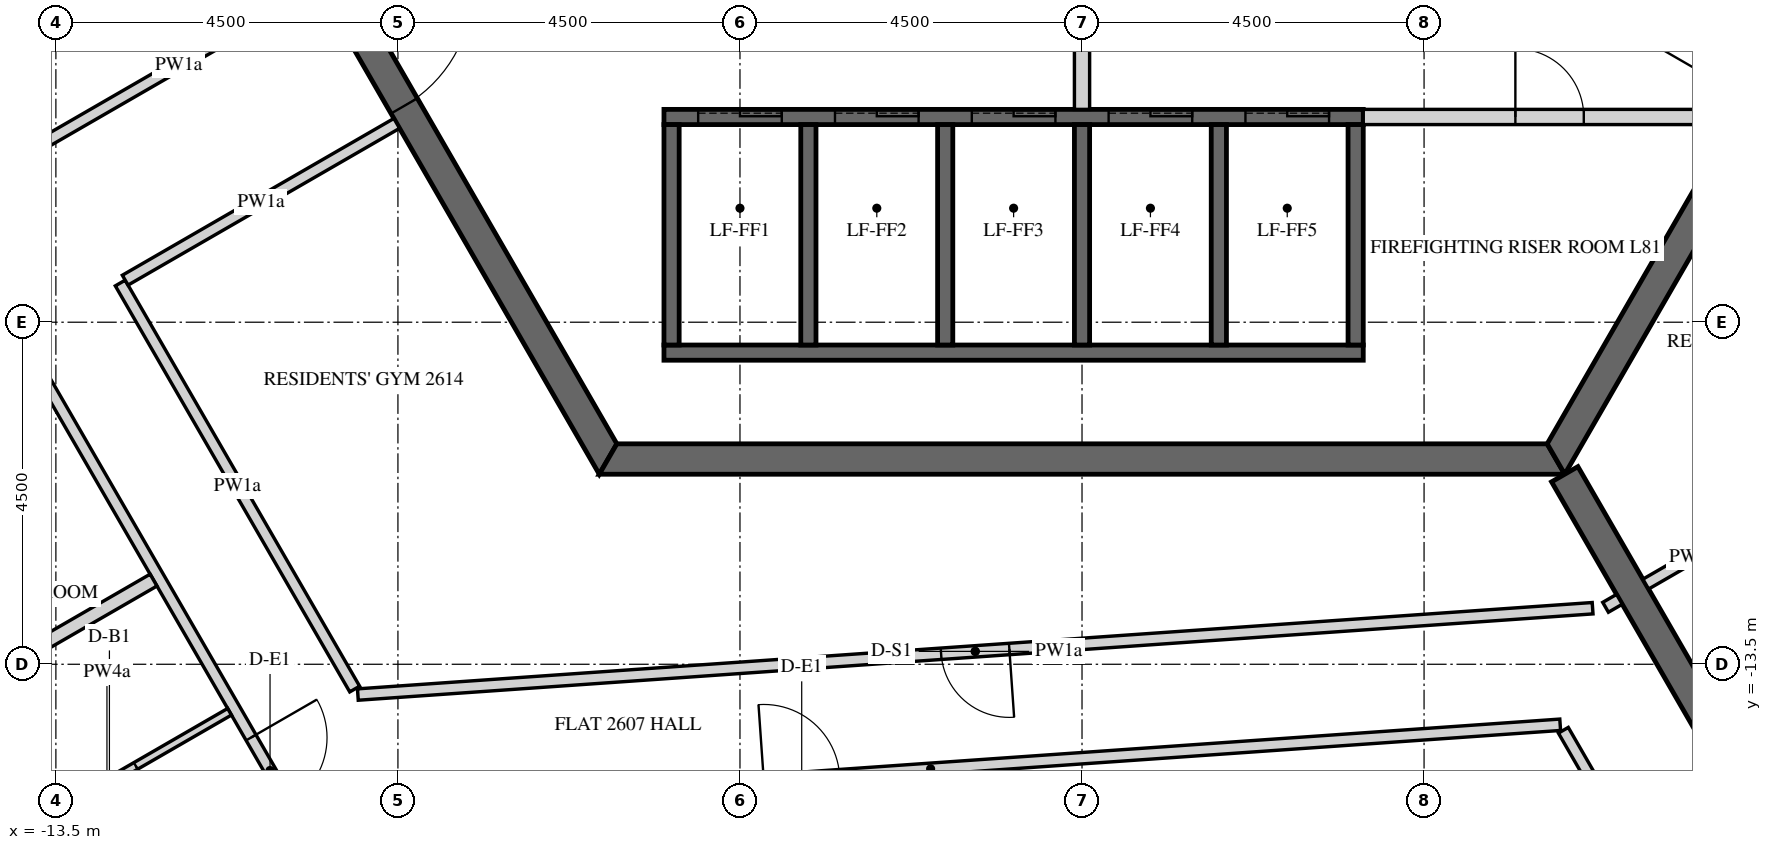
"""IFC4 building model, lengths in metres.
Left out: names, types, materials, properties, quantities, classifications, styles, units other than length and angle.
Written with IfcOpenShell. Run it as: python <this file> out.ifc"""

import sys

from ifc_helpers import new_model, si_unit, direction, frame, frame_2d, origin, place, context, subcontext, project, spatial, polyline, rectangle, outline, extrude, element, fill, save


model = new_model("IFC4")
c1 = context("Model", 3, precision=1e-05, world=origin(), true_north=direction((0.0, 1.0)))
c2 = subcontext(c1, "Body", "Model", "MODEL_VIEW")
j1 = project(units=[si_unit("LENGTHUNIT", "METRE"), si_unit("PLANEANGLEUNIT", "RADIAN")], contexts=[c1])
p1 = place(None, origin())
s1 = spatial("IfcSite", under=j1, at=p1, CompositionType="ELEMENT")
p2 = place(p1, origin())
s2 = spatial("IfcBuilding", under=s1, at=p2, CompositionType="ELEMENT")
p3 = place(p2, frame((0.0, 0.0, 334.2)))
s3 = spatial("IfcBuildingStorey", under=s2, at=p3, CompositionType="ELEMENT", Elevation=334.2)
p4 = place(p3, frame((-12.471, 0.0, -0.15), z_axis=(0.0, 0.0, 1.0), x_axis=(0.499996419489, -0.866027470984, 0.0)))
e1 = element("IfcWall", 1, at=p4, inside=s3, PredefinedType="SHEAR", context=c2, shape_type="SweptSolid", body=[
    extrude(outline(polyline([(-0.115, -0.2), (12.586, -0.2), (12.355, 0.2), (0.115, 0.2), (-0.115, -0.2)])), origin(), (0.0, 0.0, 1.0), 3.75),
])
p5 = place(p4, frame((5.306, 0.0, 0.15)))
e2 = element("IfcOpeningElement", 2, at=p5, cuts=e1, PredefinedType="OPENING", context=c2, shape_type="SweptSolid", body=[
    extrude(rectangle(XDim=1.8, YDim=2.4, at=frame_2d((0.9, 1.2))), frame((0.0, 0.21, 0.0), z_axis=(0.0, -1.0, 0.0), x_axis=(1.0, 0.0, 0.0)), (0.0, 0.0, 1.0), 0.42),
])
p6 = place(p3, frame((-6.235, -10.8, -0.15), z_axis=(0.0, 0.0, 1.0), x_axis=(1.0, 0.0, 0.0)))
e3 = element("IfcWall", 3, at=p6, inside=s3, PredefinedType="SHEAR", context=c2, shape_type="SweptSolid", body=[
    extrude(outline(polyline([(-0.115, -0.2), (12.586, -0.2), (12.355, 0.2), (0.115, 0.2), (-0.115, -0.2)])), origin(), (0.0, 0.0, 1.0), 3.75),
])
p7 = place(p3, frame((6.235, -10.8, -0.15), z_axis=(0.0, 0.0, 1.0), x_axis=(0.499996419489, 0.866027470984, 0.0)))
e4 = element("IfcWall", 4, at=p7, inside=s3, PredefinedType="SHEAR", context=c2, shape_type="SweptSolid", body=[
    extrude(outline(polyline([(-0.115, -0.2), (12.586, -0.2), (12.355, 0.2), (0.115, 0.2), (-0.115, -0.2)])), origin(), (0.0, 0.0, 1.0), 3.75),
])
p8 = place(p7, frame((5.364, 0.0, 0.15)))
e5 = element("IfcOpeningElement", 5, at=p8, cuts=e4, PredefinedType="OPENING", context=c2, shape_type="SweptSolid", body=[
    extrude(rectangle(XDim=1.8, YDim=2.4, at=frame_2d((0.9, 1.2))), frame((0.0, 0.21, 0.0), z_axis=(0.0, -1.0, 0.0), x_axis=(1.0, 0.0, 0.0)), (0.0, 0.0, 1.0), 0.42),
])
p9 = place(p3, frame((6.351, -11.0, -0.15), z_axis=(0.0, 0.0, 1.0), x_axis=(0.499998894578, -0.866026041999, 0.0)))
e6 = element("IfcWall", 6, at=p9, inside=s3, PredefinedType="SHEAR", context=c2, shape_type="SweptSolid", body=[
    extrude(rectangle(XDim=15.544, YDim=0.4, at=frame_2d((7.772, 0.0))), origin(), (0.0, 0.0, 1.0), 3.75),
])
p10 = place(p9, frame((6.872, 0.0, 0.15)))
e7 = element("IfcOpeningElement", 7, at=p10, cuts=e6, PredefinedType="OPENING", context=c2, shape_type="SweptSolid", body=[
    extrude(rectangle(XDim=1.8, YDim=2.4, at=frame_2d((0.9, 1.2))), frame((0.0, 0.21, 0.0), z_axis=(0.0, -1.0, 0.0), x_axis=(1.0, 0.0, 0.0)), (0.0, 0.0, 1.0), 0.42),
])
p11 = place(p3, frame((-5.5, -6.3, -0.25), z_axis=(0.0, 0.0, 1.0), x_axis=(1.0, 0.0, 0.0)))
e8 = element("IfcWall", 8, at=p11, inside=s3, PredefinedType="SHEAR", context=c2, shape_type="SweptSolid", body=[
    extrude(rectangle(XDim=9.2, YDim=0.2, at=frame_2d((4.6, 0.0))), origin(), (0.0, 0.0, 1.0), 3.9),
])
p12 = place(p11, frame((0.45, 0.0, 0.25)))
e9 = element("IfcOpeningElement", 9, at=p12, cuts=e8, PredefinedType="OPENING", context=c2, shape_type="SweptSolid", body=[
    extrude(rectangle(XDim=1.1, YDim=2.1, at=frame_2d((0.55, 1.05))), frame((0.0, 0.11, 0.0), z_axis=(0.0, -1.0, 0.0), x_axis=(1.0, 0.0, 0.0)), (0.0, 0.0, 1.0), 0.22),
])
p13 = place(p11, frame((2.25, 0.0, 0.25)))
e10 = element("IfcOpeningElement", 10, at=p13, cuts=e8, PredefinedType="OPENING", context=c2, shape_type="SweptSolid", body=[
    extrude(rectangle(XDim=1.1, YDim=2.1, at=frame_2d((0.55, 1.05))), frame((0.0, 0.11, 0.0), z_axis=(0.0, -1.0, 0.0), x_axis=(1.0, 0.0, 0.0)), (0.0, 0.0, 1.0), 0.22),
])
p14 = place(p11, frame((4.05, 0.0, 0.25)))
e11 = element("IfcOpeningElement", 11, at=p14, cuts=e8, PredefinedType="OPENING", context=c2, shape_type="SweptSolid", body=[
    extrude(rectangle(XDim=1.1, YDim=2.1, at=frame_2d((0.55, 1.05))), frame((0.0, 0.11, 0.0), z_axis=(0.0, -1.0, 0.0), x_axis=(1.0, 0.0, 0.0)), (0.0, 0.0, 1.0), 0.22),
])
p15 = place(p11, frame((5.85, 0.0, 0.25)))
e12 = element("IfcOpeningElement", 12, at=p15, cuts=e8, PredefinedType="OPENING", context=c2, shape_type="SweptSolid", body=[
    extrude(rectangle(XDim=1.1, YDim=2.1, at=frame_2d((0.55, 1.05))), frame((0.0, 0.11, 0.0), z_axis=(0.0, -1.0, 0.0), x_axis=(1.0, 0.0, 0.0)), (0.0, 0.0, 1.0), 0.22),
])
p16 = place(p11, frame((7.65, 0.0, 0.25)))
e13 = element("IfcOpeningElement", 13, at=p16, cuts=e8, PredefinedType="OPENING", context=c2, shape_type="SweptSolid", body=[
    extrude(rectangle(XDim=1.1, YDim=2.1, at=frame_2d((0.55, 1.05))), frame((0.0, 0.11, 0.0), z_axis=(0.0, -1.0, 0.0), x_axis=(1.0, 0.0, 0.0)), (0.0, 0.0, 1.0), 0.22),
])
p17 = place(p3, frame((-5.5, -9.4, -0.25), z_axis=(0.0, 0.0, 1.0), x_axis=(1.0, 0.0, 0.0)))
e14 = element("IfcWall", 14, at=p17, inside=s3, PredefinedType="SHEAR", context=c2, shape_type="SweptSolid", body=[
    extrude(rectangle(XDim=9.2, YDim=0.2, at=frame_2d((4.6, 0.0))), origin(), (0.0, 0.0, 1.0), 3.9),
])
for number, where, z_axis, x_axis in (
    (15, (-5.4, -9.3, -0.25), (0.0, 0.0, 1.0), (0.0, 1.0, 0.0)),
    (16, (-3.6, -9.3, -0.25), (0.0, 0.0, 1.0), (0.0, 1.0, 0.0)),
    (17, (-1.8, -9.3, -0.25), (0.0, 0.0, 1.0), (0.0, 1.0, 0.0)),
    (18, (0.0, -9.3, -0.25), (0.0, 0.0, 1.0), (0.0, 1.0, 0.0)),
    (19, (1.8, -9.3, -0.25), (0.0, 0.0, 1.0), (0.0, 1.0, 0.0)),
    (20, (3.6, -9.3, -0.25), (0.0, 0.0, 1.0), (0.0, 1.0, 0.0)),
):
    element("IfcWall", number, at=place(p3, frame(where, z_axis=z_axis, x_axis=x_axis)), inside=s3, PredefinedType="SHEAR", context=c2, shape_type="SweptSolid", body=[
        extrude(rectangle(XDim=2.9, YDim=0.2, at=frame_2d((1.45, 0.0))), origin(), (0.0, 0.0, 1.0), 3.9),
    ])
p18 = place(p3, frame((0.0, -6.2, 0.0), z_axis=(0.0, 0.0, 1.0), x_axis=(0.0, 1.0, 0.0)))
e21 = element("IfcWall", 21, at=p18, inside=s3, PredefinedType="PARTITIONING", context=c2, shape_type="SweptSolid", body=[
    extrude(rectangle(XDim=6.1, YDim=0.2, at=frame_2d((3.05, 0.0))), origin(), (0.0, 0.0, 1.0), 3.65),
])
p19 = place(p3, frame((3.7, -6.3, 0.0), z_axis=(0.0, 0.0, 1.0), x_axis=(1.0, 0.0, 0.0)))
e22 = element("IfcWall", 22, at=p19, inside=s3, PredefinedType="PARTITIONING", context=c2, shape_type="SweptSolid", body=[
    extrude(rectangle(XDim=4.903, YDim=0.2, at=frame_2d((2.451, 0.0))), origin(), (0.0, 0.0, 1.0), 3.65),
])
p20 = place(p19, frame((2.001, 0.0, 0.0)))
e23 = element("IfcOpeningElement", 23, at=p20, cuts=e22, PredefinedType="OPENING", context=c2, shape_type="SweptSolid", body=[
    extrude(rectangle(XDim=0.9, YDim=2.1, at=frame_2d((0.45, 1.05))), frame((0.0, 0.11, 0.0), z_axis=(0.0, -1.0, 0.0), x_axis=(1.0, 0.0, 0.0)), (0.0, 0.0, 1.0), 0.22),
])
p21 = place(p3, frame((-17.696, -2.749, 0.0), z_axis=(0.0, 0.0, 1.0), x_axis=(0.499997948852, -0.866026588012, 0.0)))
e24 = element("IfcWall", 24, at=p21, inside=s3, PredefinedType="PARTITIONING", context=c2, shape_type="SweptSolid", body=[
    extrude(rectangle(XDim=14.677, YDim=0.15, at=frame_2d((7.339, 0.0))), origin(), (0.0, 0.0, 1.0), 2.838),
])
p22 = place(p21, frame((0.4, 0.0, 0.0)))
e25 = element("IfcOpeningElement", 25, at=p22, cuts=e24, PredefinedType="OPENING", context=c2, shape_type="SweptSolid", body=[
    extrude(rectangle(XDim=1.0, YDim=2.1, at=frame_2d((0.5, 1.05))), frame((0.0, 0.085, 0.0), z_axis=(0.0, -1.0, 0.0), x_axis=(1.0, 0.0, 0.0)), (0.0, 0.0, 1.0), 0.17),
])
p23 = place(p21, frame((13.527, 0.0, 0.0)))
e26 = element("IfcOpeningElement", 26, at=p23, cuts=e24, PredefinedType="OPENING", context=c2, shape_type="SweptSolid", body=[
    extrude(rectangle(XDim=1.0, YDim=2.1, at=frame_2d((0.5, 1.05))), frame((0.0, 0.085, 0.0), z_axis=(0.0, -1.0, 0.0), x_axis=(1.0, 0.0, 0.0)), (0.0, 0.0, 1.0), 0.17),
])
p24 = place(p3, frame((-10.274, -15.454, 0.0), z_axis=(0.0, 0.0, 1.0), x_axis=(0.997563645223, 0.069762265797, 0.0)))
e27 = element("IfcWall", 27, at=p24, inside=s3, PredefinedType="PARTITIONING", context=c2, shape_type="SweptSolid", body=[
    extrude(rectangle(XDim=16.606, YDim=0.15, at=frame_2d((8.303, 0.0))), origin(), (0.0, 0.0, 1.0), 2.838),
])
p25 = place(p24, frame((6.103, 0.0, 0.0)))
e28 = element("IfcOpeningElement", 28, at=p25, cuts=e27, PredefinedType="OPENING", context=c2, shape_type="SweptSolid", body=[
    extrude(rectangle(XDim=1.0, YDim=2.1, at=frame_2d((0.5, 1.05))), frame((0.0, 0.085, 0.0), z_axis=(0.0, -1.0, 0.0), x_axis=(1.0, 0.0, 0.0)), (0.0, 0.0, 1.0), 0.17),
])
p26 = place(p3, frame((6.333, -14.368, 0.0), z_axis=(0.0, 0.0, 1.0), x_axis=(0.499977396983, -0.866038453249, 0.0)))
e29 = element("IfcWall", 29, at=p26, inside=s3, PredefinedType="PARTITIONING", context=c2, shape_type="SweptSolid", body=[
    extrude(rectangle(XDim=7.764, YDim=0.15, at=frame_2d((3.882, 0.0))), origin(), (0.0, 0.0, 1.0), 2.838),
])
p27 = place(p26, frame((4.364, 0.0, 0.0)))
e30 = element("IfcOpeningElement", 30, at=p27, cuts=e29, PredefinedType="OPENING", context=c2, shape_type="SweptSolid", body=[
    extrude(rectangle(XDim=1.0, YDim=2.1, at=frame_2d((0.5, 1.05))), frame((0.0, 0.085, 0.0), z_axis=(0.0, -1.0, 0.0), x_axis=(1.0, 0.0, 0.0)), (0.0, 0.0, 1.0), 0.17),
])
p28 = place(p3, frame((-10.066, -4.566, 0.0), z_axis=(0.0, 0.0, 1.0), x_axis=(-0.866023935413, -0.500002543286, 0.0)))
e31 = element("IfcWall", 31, at=p28, inside=s3, PredefinedType="PARTITIONING", context=c2, shape_type="SweptSolid", body=[
    extrude(rectangle(XDim=4.2, YDim=0.15, at=frame_2d((2.1, 0.0))), origin(), (0.0, 0.0, 1.0), 2.838),
])
p29 = place(p3, frame((7.07, -12.646, 0.0), z_axis=(0.0, 0.0, 1.0), x_axis=(-0.866378867349, -0.499387282788, 0.0)))
e32 = element("IfcWall", 32, at=p29, inside=s3, PredefinedType="PARTITIONING", context=c2, shape_type="SweptSolid", body=[
    extrude(rectangle(XDim=0.21, YDim=0.15, at=frame_2d((0.105, 0.0))), origin(), (0.0, 0.0, 1.0), 2.838),
])
p30 = place(p3, frame((6.717, -12.762, 0.0), z_axis=(0.0, 0.0, 1.0), x_axis=(-0.99756375843, -0.069760646978, 0.0)))
e33 = element("IfcWall", 33, at=p30, inside=s3, PredefinedType="PARTITIONING", context=c2, shape_type="SweptSolid", body=[
    extrude(rectangle(XDim=16.284, YDim=0.15, at=frame_2d((8.142, 0.0))), origin(), (0.0, 0.0, 1.0), 2.838),
])
p31 = place(p30, frame((7.692, 0.0, 0.0)))
e34 = element("IfcOpeningElement", 34, at=p31, cuts=e33, PredefinedType="OPENING", context=c2, shape_type="SweptSolid", body=[
    extrude(rectangle(XDim=0.9, YDim=2.1, at=frame_2d((0.45, 1.05))), frame((0.0, 0.085, 0.0), z_axis=(0.0, -1.0, 0.0), x_axis=(1.0, 0.0, 0.0)), (0.0, 0.0, 1.0), 0.17),
])
p32 = place(p3, frame((-9.569, -13.826, 0.0), z_axis=(0.0, 0.0, 1.0), x_axis=(-0.500017101833, 0.866015529811, 0.0)))
e35 = element("IfcWall", 35, at=p32, inside=s3, PredefinedType="PARTITIONING", context=c2, shape_type="SweptSolid", body=[
    extrude(rectangle(XDim=6.168, YDim=0.15, at=frame_2d((3.084, 0.0))), origin(), (0.0, 0.0, 1.0), 2.838),
])
p33 = place(p3, frame((-12.588, -8.447, 0.0), z_axis=(0.0, 0.0, 1.0), x_axis=(0.866034795751, 0.499983732284, 0.0)))
e36 = element("IfcWall", 36, at=p33, inside=s3, PredefinedType="PARTITIONING", context=c2, shape_type="SweptSolid", body=[
    extrude(rectangle(XDim=4.125, YDim=0.15, at=frame_2d((2.062, 0.0))), origin(), (0.0, 0.0, 1.0), 2.838),
])
p34 = place(p3, frame((8.65, -11.733, 0.0), z_axis=(0.0, 0.0, 1.0), x_axis=(-0.866062911188, -0.499935029643, 0.0)))
e37 = element("IfcWall", 37, at=p34, inside=s3, PredefinedType="PARTITIONING", context=c2, shape_type="SweptSolid", body=[
    extrude(rectangle(XDim=1.425, YDim=0.15, at=frame_2d((0.712, 0.0))), origin(), (0.0, 0.0, 1.0), 2.838),
])
p35 = place(p3, frame((-19.771, -16.755, 0.0), z_axis=(0.0, 0.0, 1.0), x_axis=(0.866025292695, 0.500000192413, 0.0)))
e38 = element("IfcWall", 38, at=p35, inside=s3, PredefinedType="PARTITIONING", context=c2, shape_type="SweptSolid", body=[
    extrude(rectangle(XDim=8.725, YDim=0.18, at=frame_2d((4.363, 0.0))), origin(), (0.0, 0.0, 1.0), 2.838),
])
p36 = place(p3, frame((-11.215, -14.125, 0.0), z_axis=(0.0, 0.0, 1.0), x_axis=(-0.866028424924, -0.499994767197, 0.0)))
e39 = element("IfcWall", 39, at=p36, inside=s3, PredefinedType="PARTITIONING", context=c2, shape_type="SweptSolid", body=[
    extrude(rectangle(XDim=3.725, YDim=0.1, at=frame_2d((1.863, 0.0))), origin(), (0.0, 0.0, 1.0), 2.838),
])
p37 = place(p36, frame((1.425, 0.0, 0.0)))
e40 = element("IfcOpeningElement", 40, at=p37, cuts=e39, PredefinedType="OPENING", context=c2, shape_type="SweptSolid", body=[
    extrude(rectangle(XDim=0.8, YDim=2.1, at=frame_2d((0.4, 1.05))), frame((0.0, 0.06, 0.0), z_axis=(0.0, -1.0, 0.0), x_axis=(1.0, 0.0, 0.0)), (0.0, 0.0, 1.0), 0.12),
])
p38 = place(p5, origin())
e41 = element("IfcDoor", 41, at=p38, inside=s3, OperationType="DOUBLE_DOOR_SINGLE_SWING", PredefinedType="DOOR", context=c2, shape_type="SweptSolid", body=[
    extrude(rectangle(XDim=1.8, YDim=2.4, at=frame_2d((0.9, 1.2))), frame((0.0, 0.025, 0.0), z_axis=(0.0, -1.0, 0.0), x_axis=(1.0, 0.0, 0.0)), (0.0, 0.0, 1.0), 0.05),
])
fill(e2, e41)
p39 = place(p20, origin())
e42 = element("IfcDoor", 42, at=p39, inside=s3, OperationType="SINGLE_SWING_LEFT", PredefinedType="DOOR", context=c2, shape_type="SweptSolid", body=[
    extrude(rectangle(XDim=0.9, YDim=2.1, at=frame_2d((0.45, 1.05))), frame((0.0, 0.025, 0.0), z_axis=(0.0, -1.0, 0.0), x_axis=(1.0, 0.0, 0.0)), (0.0, 0.0, 1.0), 0.05),
])
fill(e23, e42)
p40 = place(p12, origin())
e43 = element("IfcDoor", 43, at=p40, inside=s3, OperationType="SLIDING_TO_LEFT", PredefinedType="DOOR", context=c2, shape_type="SweptSolid", body=[
    extrude(rectangle(XDim=1.1, YDim=2.1, at=frame_2d((0.55, 1.05))), frame((0.0, 0.025, 0.0), z_axis=(0.0, -1.0, 0.0), x_axis=(1.0, 0.0, 0.0)), (0.0, 0.0, 1.0), 0.05),
])
fill(e9, e43)
p41 = place(p13, origin())
e44 = element("IfcDoor", 44, at=p41, inside=s3, OperationType="SLIDING_TO_LEFT", PredefinedType="DOOR", context=c2, shape_type="SweptSolid", body=[
    extrude(rectangle(XDim=1.1, YDim=2.1, at=frame_2d((0.55, 1.05))), frame((0.0, 0.025, 0.0), z_axis=(0.0, -1.0, 0.0), x_axis=(1.0, 0.0, 0.0)), (0.0, 0.0, 1.0), 0.05),
])
fill(e10, e44)
p42 = place(p14, origin())
e45 = element("IfcDoor", 45, at=p42, inside=s3, OperationType="SLIDING_TO_LEFT", PredefinedType="DOOR", context=c2, shape_type="SweptSolid", body=[
    extrude(rectangle(XDim=1.1, YDim=2.1, at=frame_2d((0.55, 1.05))), frame((0.0, 0.025, 0.0), z_axis=(0.0, -1.0, 0.0), x_axis=(1.0, 0.0, 0.0)), (0.0, 0.0, 1.0), 0.05),
])
fill(e11, e45)
p43 = place(p15, origin())
e46 = element("IfcDoor", 46, at=p43, inside=s3, OperationType="SLIDING_TO_LEFT", PredefinedType="DOOR", context=c2, shape_type="SweptSolid", body=[
    extrude(rectangle(XDim=1.1, YDim=2.1, at=frame_2d((0.55, 1.05))), frame((0.0, 0.025, 0.0), z_axis=(0.0, -1.0, 0.0), x_axis=(1.0, 0.0, 0.0)), (0.0, 0.0, 1.0), 0.05),
])
fill(e12, e46)
p44 = place(p16, origin())
e47 = element("IfcDoor", 47, at=p44, inside=s3, OperationType="SLIDING_TO_LEFT", PredefinedType="DOOR", context=c2, shape_type="SweptSolid", body=[
    extrude(rectangle(XDim=1.1, YDim=2.1, at=frame_2d((0.55, 1.05))), frame((0.0, 0.025, 0.0), z_axis=(0.0, -1.0, 0.0), x_axis=(1.0, 0.0, 0.0)), (0.0, 0.0, 1.0), 0.05),
])
fill(e13, e47)
p45 = place(p23, origin())
e48 = element("IfcDoor", 48, at=p45, inside=s3, OperationType="SINGLE_SWING_LEFT", PredefinedType="DOOR", context=c2, shape_type="SweptSolid", body=[
    extrude(rectangle(XDim=1.0, YDim=2.1, at=frame_2d((0.5, 1.05))), frame((0.0, 0.025, 0.0), z_axis=(0.0, -1.0, 0.0), x_axis=(1.0, 0.0, 0.0)), (0.0, 0.0, 1.0), 0.05),
])
fill(e26, e48)
p46 = place(p37, origin())
e49 = element("IfcDoor", 49, at=p46, inside=s3, OperationType="SINGLE_SWING_RIGHT", PredefinedType="DOOR", context=c2, shape_type="SweptSolid", body=[
    extrude(rectangle(XDim=0.8, YDim=2.1, at=frame_2d((0.4, 1.05))), frame((0.0, 0.025, 0.0), z_axis=(0.0, -1.0, 0.0), x_axis=(1.0, 0.0, 0.0)), (0.0, 0.0, 1.0), 0.05),
])
fill(e40, e49)
p47 = place(p31, origin())
e50 = element("IfcDoor", 50, at=p47, inside=s3, OperationType="SINGLE_SWING_RIGHT", PredefinedType="DOOR", context=c2, shape_type="SweptSolid", body=[
    extrude(rectangle(XDim=0.9, YDim=2.1, at=frame_2d((0.45, 1.05))), frame((0.0, 0.025, 0.0), z_axis=(0.0, -1.0, 0.0), x_axis=(1.0, 0.0, 0.0)), (0.0, 0.0, 1.0), 0.05),
])
fill(e34, e50)
save(model, sys.argv[1])
